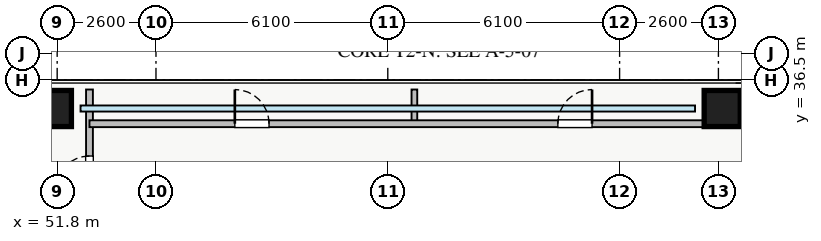
"""IFC4 building model, lengths in metres.
Left out: names, types, materials, properties, quantities, classifications, styles, units other than length and angle.
Written with IfcOpenShell. Run it as: python <this file> out.ifc"""

import sys

from ifc_helpers import new_model, si_unit, direction, frame, frame_2d, origin, origin_2d, place, context, subcontext, project, spatial, rectangle, extrude, source, transform, mapped, element, fill, save


model = new_model("IFC4")
c1 = context("Model", 3, precision=1e-05, world=origin(), true_north=direction((0.0, 1.0)))
c2 = subcontext(c1, "Body", "Model", "MODEL_VIEW")
j1 = project(units=[si_unit("LENGTHUNIT", "METRE"), si_unit("PLANEANGLEUNIT", "RADIAN")], contexts=[c1])
p1 = place(None, origin())
s1 = spatial("IfcSite", under=j1, at=p1, CompositionType="ELEMENT")
p2 = place(p1, origin())
s2 = spatial("IfcBuilding", under=s1, at=p2, CompositionType="ELEMENT")
p3 = place(p2, frame((0.0, 0.0, 39.25)))
s3 = spatial("IfcBuildingStorey", under=s2, at=p3, CompositionType="ELEMENT", Elevation=39.25)
m1 = source(origin(), c2, "Body", "SweptSolid", [
    extrude(rectangle(XDim=0.95, YDim=0.95, at=origin_2d()), origin(), (0.0, 0.0, 1.0), 3.25),
])
for number, where, z_axis, x_axis in (
    (1, (69.3, 35.75, 0.0), (0.0, 0.0, 1.0), (1.0, 0.0, 0.0)),
    (2, (51.7, 35.75, 0.0), (0.0, 0.0, 1.0), (1.0, 0.0, 0.0)),
):
    element("IfcColumn", number, at=place(p3, frame(where, z_axis=z_axis, x_axis=x_axis)), inside=s3, PredefinedType="COLUMN", context=c2, shape_type="MappedRepresentation", body=[
        mapped(m1, transform((0.0, 0.0, 0.0), x_axis=(1.0, 0.0, 0.0), y_axis=(0.0, 1.0, 0.0), z_axis=(0.0, 0.0, 1.0), scale=1.0)),
    ])
p4 = place(p3, frame((52.65, 9.75, 0.0), z_axis=(0.0, 0.0, 1.0), x_axis=(0.0, 1.0, 0.0)))
e3 = element("IfcWall", 3, at=p4, inside=s3, PredefinedType="PARTITIONING", context=c2, shape_type="SweptSolid", body=[
    extrude(rectangle(XDim=26.5, YDim=0.18, at=frame_2d((13.25, 0.0))), origin(), (0.0, 0.0, 1.0), 3.07),
])
p5 = place(p4, frame((23.85, 0.0, 0.0)))
e4 = element("IfcOpeningElement", 4, at=p5, cuts=e3, PredefinedType="OPENING", context=c2, shape_type="SweptSolid", body=[
    extrude(rectangle(XDim=0.9, YDim=2.05, at=frame_2d((0.45, 1.025))), frame((0.0, 0.1, 0.0), z_axis=(0.0, -1.0, 0.0), x_axis=(1.0, 0.0, 0.0)), (0.0, 0.0, 1.0), 0.2),
])
p6 = place(p4, frame((1.75, 0.0, 0.0)))
e5 = element("IfcOpeningElement", 5, at=p6, cuts=e3, PredefinedType="OPENING", context=c2, shape_type="SweptSolid", body=[
    extrude(rectangle(XDim=0.9, YDim=2.05, at=frame_2d((0.45, 1.025))), frame((0.0, 0.1, 0.0), z_axis=(0.0, -1.0, 0.0), x_axis=(1.0, 0.0, 0.0)), (0.0, 0.0, 1.0), 0.2),
])
p7 = place(p4, frame((7.015, 0.0, 0.0)))
e6 = element("IfcOpeningElement", 6, at=p7, cuts=e3, PredefinedType="OPENING", context=c2, shape_type="SweptSolid", body=[
    extrude(rectangle(XDim=1.0, YDim=2.05, at=frame_2d((0.5, 1.025))), frame((0.0, 0.1, 0.0), z_axis=(0.0, -1.0, 0.0), x_axis=(1.0, 0.0, 0.0)), (0.0, 0.0, 1.0), 0.2),
])
p8 = place(p4, frame((15.995, 0.0, 0.0)))
e7 = element("IfcOpeningElement", 7, at=p8, cuts=e3, PredefinedType="OPENING", context=c2, shape_type="SweptSolid", body=[
    extrude(rectangle(XDim=1.0, YDim=2.05, at=frame_2d((0.5, 1.025))), frame((0.0, 0.1, 0.0), z_axis=(0.0, -1.0, 0.0), x_axis=(1.0, 0.0, 0.0)), (0.0, 0.0, 1.0), 0.2),
])
for number, where, z_axis, x_axis in (
    (8, (61.2, 35.35, 0.0), (0.0, 0.0, 1.0), (0.0, 1.0, 0.0)),
    (9, (69.65, 35.35, 0.0), (0.0, 0.0, 1.0), (0.0, 1.0, 0.0)),
):
    element("IfcWall", number, at=place(p3, frame(where, z_axis=z_axis, x_axis=x_axis)), inside=s3, PredefinedType="PARTITIONING", context=c2, shape_type="SweptSolid", body=[
        extrude(rectangle(XDim=0.9, YDim=0.15, at=frame_2d((0.45, 0.0))), origin(), (0.0, 0.0, 1.0), 3.07),
    ])
p9 = place(p3, frame((52.65, 35.35, 0.0), z_axis=(0.0, 0.0, 1.0), x_axis=(1.0, 0.0, 0.0)))
e10 = element("IfcWall", 10, at=p9, inside=s3, PredefinedType="PARTITIONING", context=c2, shape_type="SweptSolid", body=[
    extrude(rectangle(XDim=17.0, YDim=0.18, at=frame_2d((8.5, 0.0))), origin(), (0.0, 0.0, 1.0), 3.07),
])
p10 = place(p9, frame((3.825, 0.0, 0.0)))
e11 = element("IfcOpeningElement", 11, at=p10, cuts=e10, PredefinedType="OPENING", context=c2, shape_type="SweptSolid", body=[
    extrude(rectangle(XDim=0.9, YDim=2.05, at=frame_2d((0.45, 1.025))), frame((0.0, 0.1, 0.0), z_axis=(0.0, -1.0, 0.0), x_axis=(1.0, 0.0, 0.0)), (0.0, 0.0, 1.0), 0.2),
])
p11 = place(p9, frame((12.325, 0.0, 0.0)))
e12 = element("IfcOpeningElement", 12, at=p11, cuts=e10, PredefinedType="OPENING", context=c2, shape_type="SweptSolid", body=[
    extrude(rectangle(XDim=0.9, YDim=2.05, at=frame_2d((0.45, 1.025))), frame((0.0, 0.1, 0.0), z_axis=(0.0, -1.0, 0.0), x_axis=(1.0, 0.0, 0.0)), (0.0, 0.0, 1.0), 0.2),
])
m2 = source(origin(), c2, "Body", "SweptSolid", [
    extrude(rectangle(XDim=0.9, YDim=2.05, at=frame_2d((0.45, 1.025))), frame((0.0, 0.025, 0.0), z_axis=(0.0, -1.0, 0.0), x_axis=(1.0, 0.0, 0.0)), (0.0, 0.0, 1.0), 0.05),
])
p12 = place(p5, origin())
e13 = element("IfcDoor", 13, at=p12, inside=s3, OperationType="SINGLE_SWING_LEFT", PredefinedType="DOOR", context=c2, shape_type="MappedRepresentation", body=[
    mapped(m2, transform((0.0, 0.0, 0.0), x_axis=(1.0, 0.0, 0.0), y_axis=(0.0, 1.0, 0.0), z_axis=(0.0, 0.0, 1.0), scale=1.0)),
])
fill(e4, e13)
p13 = place(p10, origin())
e14 = element("IfcDoor", 14, at=p13, inside=s3, OperationType="SINGLE_SWING_LEFT", PredefinedType="DOOR", context=c2, shape_type="MappedRepresentation", body=[
    mapped(m2, transform((0.0, 0.0, 0.0), x_axis=(1.0, 0.0, 0.0), y_axis=(0.0, 1.0, 0.0), z_axis=(0.0, 0.0, 1.0), scale=1.0)),
])
fill(e11, e14)
p14 = place(p11, origin())
e15 = element("IfcDoor", 15, at=p14, inside=s3, OperationType="SINGLE_SWING_RIGHT", PredefinedType="DOOR", context=c2, shape_type="MappedRepresentation", body=[
    mapped(m2, transform((0.0, 0.0, 0.0), x_axis=(1.0, 0.0, 0.0), y_axis=(0.0, 1.0, 0.0), z_axis=(0.0, 0.0, 1.0), scale=1.0)),
])
fill(e12, e15)
save(model, sys.argv[1])
